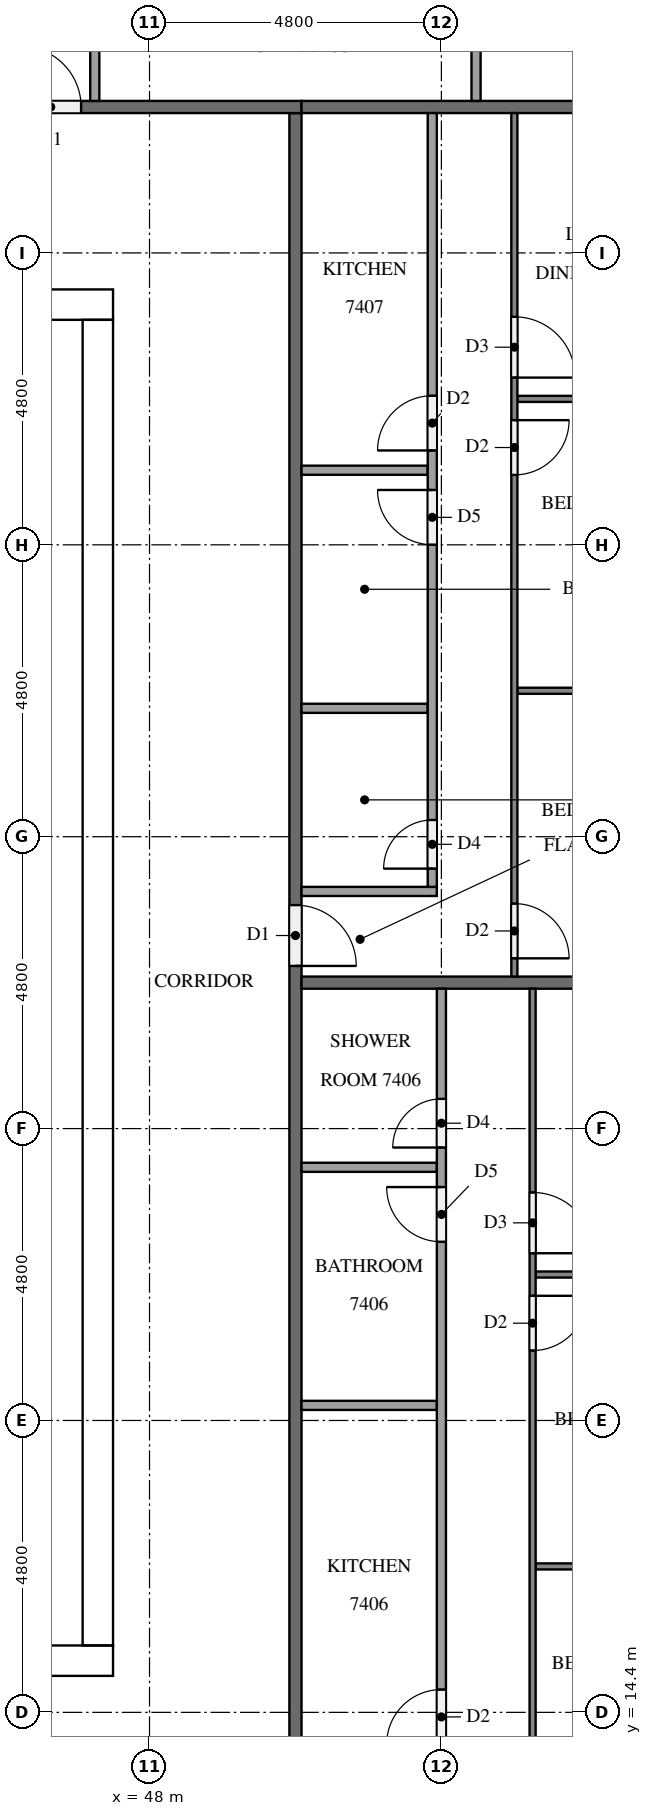
"""IFC4 building model, lengths in metres.
Left out: names, types, materials, properties, quantities, classifications, styles, units other than length and angle.
Written with IfcOpenShell. Run it as: python <this file> out.ifc"""

import sys

from ifc_helpers import new_model, si_unit, direction, frame, frame_2d, origin, place, context, subcontext, project, spatial, rectangle, extrude, element, fill, save


model = new_model("IFC4")
c1 = context("Model", 3, precision=1e-05, world=origin(), true_north=direction((0.0, 1.0)))
c2 = subcontext(c1, "Body", "Model", "MODEL_VIEW")
j1 = project(units=[si_unit("LENGTHUNIT", "METRE"), si_unit("PLANEANGLEUNIT", "RADIAN")], contexts=[c1])
p1 = place(None, origin())
s1 = spatial("IfcSite", under=j1, at=p1, CompositionType="ELEMENT")
p2 = place(p1, origin())
s2 = spatial("IfcBuilding", under=s1, at=p2, CompositionType="ELEMENT")
p3 = place(p2, frame((0.0, 0.0, 282.6)))
s3 = spatial("IfcBuildingStorey", under=s2, at=p3, CompositionType="ELEMENT", Elevation=282.6)
p4 = place(p3, frame((15.0, 15.25, 0.0), z_axis=(0.0, 0.0, 1.0), x_axis=(1.0, 0.0, 0.0)))
e1 = element("IfcWall", 1, at=p4, inside=s3, PredefinedType="SHEAR", context=c2, shape_type="SweptSolid", body=[
    extrude(rectangle(XDim=32.4, YDim=0.5, at=frame_2d((16.2, 0.0))), origin(), (0.0, 0.0, 1.0), 3.2),
])
p5 = place(p4, frame((15.3, 0.0, 0.0)))
e2 = element("IfcOpeningElement", 2, at=p5, cuts=e1, PredefinedType="OPENING", context=c2, shape_type="SweptSolid", body=[
    extrude(rectangle(XDim=1.8, YDim=2.1, at=frame_2d((0.9, 1.05))), frame((0.0, 0.26, 0.0), z_axis=(0.0, -1.0, 0.0), x_axis=(1.0, 0.0, 0.0)), (0.0, 0.0, 1.0), 0.52),
])
p6 = place(p3, frame((15.0, 37.55, 0.0), z_axis=(0.0, 0.0, 1.0), x_axis=(1.0, 0.0, 0.0)))
e3 = element("IfcWall", 3, at=p6, inside=s3, PredefinedType="SHEAR", context=c2, shape_type="SweptSolid", body=[
    extrude(rectangle(XDim=32.4, YDim=0.5, at=frame_2d((16.2, 0.0))), origin(), (0.0, 0.0, 1.0), 3.2),
])
p7 = place(p6, frame((15.3, 0.0, 0.0)))
e4 = element("IfcOpeningElement", 4, at=p7, cuts=e3, PredefinedType="OPENING", context=c2, shape_type="SweptSolid", body=[
    extrude(rectangle(XDim=1.8, YDim=2.1, at=frame_2d((0.9, 1.05))), frame((0.0, 0.26, 0.0), z_axis=(0.0, -1.0, 0.0), x_axis=(1.0, 0.0, 0.0)), (0.0, 0.0, 1.0), 0.52),
])
p8 = place(p6, frame((1.282, 0.0, 0.0)))
e5 = element("IfcOpeningElement", 5, at=p8, cuts=e3, PredefinedType="OPENING", context=c2, shape_type="SweptSolid", body=[
    extrude(rectangle(XDim=1.0, YDim=2.1, at=frame_2d((0.5, 1.05))), frame((0.0, 0.26, 0.0), z_axis=(0.0, -1.0, 0.0), x_axis=(1.0, 0.0, 0.0)), (0.0, 0.0, 1.0), 0.52),
])
p9 = place(p6, frame((5.082, 0.0, 0.0)))
e6 = element("IfcOpeningElement", 6, at=p9, cuts=e3, PredefinedType="OPENING", context=c2, shape_type="SweptSolid", body=[
    extrude(rectangle(XDim=1.0, YDim=2.1, at=frame_2d((0.5, 1.05))), frame((0.0, 0.26, 0.0), z_axis=(0.0, -1.0, 0.0), x_axis=(1.0, 0.0, 0.0)), (0.0, 0.0, 1.0), 0.52),
])
p10 = place(p3, frame((47.15, 15.5, 0.0), z_axis=(0.0, 0.0, 1.0), x_axis=(0.0, 1.0, 0.0)))
e7 = element("IfcWall", 7, at=p10, inside=s3, PredefinedType="SHEAR", context=c2, shape_type="SweptSolid", body=[
    extrude(rectangle(XDim=21.8, YDim=0.5, at=frame_2d((10.9, 0.0))), origin(), (0.0, 0.0, 1.0), 3.2),
])
p11 = place(p10, frame((10.6, 0.0, 0.0)))
e8 = element("IfcOpeningElement", 8, at=p11, cuts=e7, PredefinedType="OPENING", context=c2, shape_type="SweptSolid", body=[
    extrude(rectangle(XDim=1.2, YDim=2.1, at=frame_2d((0.6, 1.05))), frame((0.0, 0.26, 0.0), z_axis=(0.0, -1.0, 0.0), x_axis=(1.0, 0.0, 0.0)), (0.0, 0.0, 1.0), 0.52),
])
p12 = place(p3, frame((50.4, 40.7, 0.0), z_axis=(0.0, 0.0, 1.0), x_axis=(0.0, -1.0, 0.0)))
e9 = element("IfcWall", 9, at=p12, inside=s3, PredefinedType="PARTITIONING", context=c2, shape_type="SweptSolid", body=[
    extrude(rectangle(XDim=28.6, YDim=0.2, at=frame_2d((14.3, 0.0))), origin(), (0.0, 0.0, 1.0), 3.2),
])
p13 = place(p12, frame((27.425, 0.0, 0.0)))
e10 = element("IfcOpeningElement", 10, at=p13, cuts=e9, PredefinedType="OPENING", context=c2, shape_type="SweptSolid", body=[
    extrude(rectangle(XDim=1.0, YDim=2.1, at=frame_2d((0.5, 1.05))), frame((0.0, 0.11, 0.0), z_axis=(0.0, -1.0, 0.0), x_axis=(1.0, 0.0, 0.0)), (0.0, 0.0, 1.0), 0.22),
])
p14 = place(p12, frame((13.025, 0.0, 0.0)))
e11 = element("IfcOpeningElement", 11, at=p14, cuts=e9, PredefinedType="OPENING", context=c2, shape_type="SweptSolid", body=[
    extrude(rectangle(XDim=1.0, YDim=2.1, at=frame_2d((0.5, 1.05))), frame((0.0, 0.11, 0.0), z_axis=(0.0, -1.0, 0.0), x_axis=(1.0, 0.0, 0.0)), (0.0, 0.0, 1.0), 0.22),
])
p15 = place(p3, frame((11.9, 40.8, 0.0), z_axis=(0.0, 0.0, 1.0), x_axis=(1.0, 0.0, 0.0)))
e12 = element("IfcWall", 12, at=p15, inside=s3, PredefinedType="PARTITIONING", context=c2, shape_type="SweptSolid", body=[
    extrude(rectangle(XDim=38.6, YDim=0.2, at=frame_2d((19.3, 0.0))), origin(), (0.0, 0.0, 1.0), 3.2),
])
p16 = place(p15, frame((33.975, 0.0, 0.0)))
e13 = element("IfcOpeningElement", 13, at=p16, cuts=e12, PredefinedType="OPENING", context=c2, shape_type="SweptSolid", body=[
    extrude(rectangle(XDim=1.0, YDim=2.1, at=frame_2d((0.5, 1.05))), frame((0.0, 0.11, 0.0), z_axis=(0.0, -1.0, 0.0), x_axis=(1.0, 0.0, 0.0)), (0.0, 0.0, 1.0), 0.22),
])
p17 = place(p15, frame((14.725, 0.0, 0.0)))
e14 = element("IfcOpeningElement", 14, at=p17, cuts=e12, PredefinedType="OPENING", context=c2, shape_type="SweptSolid", body=[
    extrude(rectangle(XDim=1.1, YDim=2.1, at=frame_2d((0.55, 1.05))), frame((0.0, 0.11, 0.0), z_axis=(0.0, -1.0, 0.0), x_axis=(1.0, 0.0, 0.0)), (0.0, 0.0, 1.0), 0.22),
])
p18 = place(p15, frame((13.225, 0.0, 0.0)))
e15 = element("IfcOpeningElement", 15, at=p18, cuts=e12, PredefinedType="OPENING", context=c2, shape_type="SweptSolid", body=[
    extrude(rectangle(XDim=1.0, YDim=2.1, at=frame_2d((0.5, 1.05))), frame((0.0, 0.11, 0.0), z_axis=(0.0, -1.0, 0.0), x_axis=(1.0, 0.0, 0.0)), (0.0, 0.0, 1.0), 0.22),
])
p19 = place(p15, frame((1.225, 0.0, 0.0)))
e16 = element("IfcOpeningElement", 16, at=p19, cuts=e12, PredefinedType="OPENING", context=c2, shape_type="SweptSolid", body=[
    extrude(rectangle(XDim=1.0, YDim=2.1, at=frame_2d((0.5, 1.05))), frame((0.0, 0.11, 0.0), z_axis=(0.0, -1.0, 0.0), x_axis=(1.0, 0.0, 0.0)), (0.0, 0.0, 1.0), 0.22),
])
for number, where, z_axis, x_axis in (
    (17, (50.5, 26.4, 0.0), (0.0, 0.0, 1.0), (1.0, 0.0, 0.0)),
    (18, (50.5, 40.8, 0.0), (0.0, 0.0, 1.0), (1.0, 0.0, 0.0)),
):
    element("IfcWall", number, at=place(p3, frame(where, z_axis=z_axis, x_axis=x_axis)), inside=s3, PredefinedType="PARTITIONING", context=c2, shape_type="SweptSolid", body=[
        extrude(rectangle(XDim=7.0, YDim=0.2, at=frame_2d((3.5, 0.0))), origin(), (0.0, 0.0, 1.0), 3.2),
    ])
for number, where, z_axis, x_axis in (
    (19, (54.35, 16.8, 0.0), (0.0, 0.0, 1.0), (1.0, 0.0, 0.0)),
    (20, (54.35, 21.6, 0.0), (0.0, 0.0, 1.0), (1.0, 0.0, 0.0)),
):
    element("IfcWall", number, at=place(p3, frame(where, z_axis=z_axis, x_axis=x_axis)), inside=s3, PredefinedType="PARTITIONING", context=c2, shape_type="SweptSolid", body=[
        extrude(rectangle(XDim=3.15, YDim=0.1, at=frame_2d((1.575, 0.0))), origin(), (0.0, 0.0, 1.0), 3.2),
    ])
p20 = place(p3, frame((54.3, 26.3, 0.0), z_axis=(0.0, 0.0, 1.0), x_axis=(0.0, -1.0, 0.0)))
e21 = element("IfcWall", 21, at=p20, inside=s3, PredefinedType="PARTITIONING", context=c2, shape_type="SweptSolid", body=[
    extrude(rectangle(XDim=14.2, YDim=0.1, at=frame_2d((7.1, 0.0))), origin(), (0.0, 0.0, 1.0), 3.2),
])
p21 = place(p20, frame((13.0, 0.0, 0.0)))
e22 = element("IfcOpeningElement", 22, at=p21, cuts=e21, PredefinedType="OPENING", context=c2, shape_type="SweptSolid", body=[
    extrude(rectangle(XDim=0.9, YDim=2.1, at=frame_2d((0.45, 1.05))), frame((0.0, 0.06, 0.0), z_axis=(0.0, -1.0, 0.0), x_axis=(1.0, 0.0, 0.0)), (0.0, 0.0, 1.0), 0.12),
])
p22 = place(p20, frame((5.05, 0.0, 0.0)))
e23 = element("IfcOpeningElement", 23, at=p22, cuts=e21, PredefinedType="OPENING", context=c2, shape_type="SweptSolid", body=[
    extrude(rectangle(XDim=0.9, YDim=2.1, at=frame_2d((0.45, 1.05))), frame((0.0, 0.06, 0.0), z_axis=(0.0, -1.0, 0.0), x_axis=(1.0, 0.0, 0.0)), (0.0, 0.0, 1.0), 0.12),
])
p23 = place(p20, frame((3.35, 0.0, 0.0)))
e24 = element("IfcOpeningElement", 24, at=p23, cuts=e21, PredefinedType="OPENING", context=c2, shape_type="SweptSolid", body=[
    extrude(rectangle(XDim=1.0, YDim=2.1, at=frame_2d((0.5, 1.05))), frame((0.0, 0.06, 0.0), z_axis=(0.0, -1.0, 0.0), x_axis=(1.0, 0.0, 0.0)), (0.0, 0.0, 1.0), 0.12),
])
for number, where, z_axis, x_axis in (
    (25, (50.5, 19.448, 0.0), (0.0, 0.0, 1.0), (1.0, 0.0, 0.0)),
    (26, (50.5, 23.364, 0.0), (0.0, 0.0, 1.0), (1.0, 0.0, 0.0)),
):
    element("IfcWall", number, at=place(p3, frame(where, z_axis=z_axis, x_axis=x_axis)), inside=s3, PredefinedType="PARTITIONING", context=c2, shape_type="SweptSolid", body=[
        extrude(rectangle(XDim=2.225, YDim=0.15, at=frame_2d((1.113, 0.0))), origin(), (0.0, 0.0, 1.0), 3.2),
    ])
p24 = place(p3, frame((52.8, 13.575, 0.0), z_axis=(0.0, 0.0, 1.0), x_axis=(0.0, 1.0, 0.0)))
e27 = element("IfcWall", 27, at=p24, inside=s3, PredefinedType="PARTITIONING", context=c2, shape_type="SweptSolid", body=[
    extrude(rectangle(XDim=12.725, YDim=0.15, at=frame_2d((6.363, 0.0))), origin(), (0.0, 0.0, 1.0), 3.2),
])
p25 = place(p24, frame((0.3, 0.0, 0.0)))
e28 = element("IfcOpeningElement", 28, at=p25, cuts=e27, PredefinedType="OPENING", context=c2, shape_type="SweptSolid", body=[
    extrude(rectangle(XDim=0.9, YDim=2.1, at=frame_2d((0.45, 1.05))), frame((0.0, 0.085, 0.0), z_axis=(0.0, -1.0, 0.0), x_axis=(1.0, 0.0, 0.0)), (0.0, 0.0, 1.0), 0.17),
])
p26 = place(p24, frame((8.563, 0.0, 0.0)))
e29 = element("IfcOpeningElement", 29, at=p26, cuts=e27, PredefinedType="OPENING", context=c2, shape_type="SweptSolid", body=[
    extrude(rectangle(XDim=0.9, YDim=2.1, at=frame_2d((0.45, 1.05))), frame((0.0, 0.085, 0.0), z_axis=(0.0, -1.0, 0.0), x_axis=(1.0, 0.0, 0.0)), (0.0, 0.0, 1.0), 0.17),
])
p27 = place(p24, frame((10.114, 0.0, 0.0)))
e30 = element("IfcOpeningElement", 30, at=p27, cuts=e27, PredefinedType="OPENING", context=c2, shape_type="SweptSolid", body=[
    extrude(rectangle(XDim=0.8, YDim=2.1, at=frame_2d((0.4, 1.05))), frame((0.0, 0.085, 0.0), z_axis=(0.0, -1.0, 0.0), x_axis=(1.0, 0.0, 0.0)), (0.0, 0.0, 1.0), 0.17),
])
for number, where, z_axis, x_axis in (
    (31, (54.05, 31.2, 0.0), (0.0, 0.0, 1.0), (1.0, 0.0, 0.0)),
    (32, (54.05, 36.0, 0.0), (0.0, 0.0, 1.0), (1.0, 0.0, 0.0)),
):
    element("IfcWall", number, at=place(p3, frame(where, z_axis=z_axis, x_axis=x_axis)), inside=s3, PredefinedType="PARTITIONING", context=c2, shape_type="SweptSolid", body=[
        extrude(rectangle(XDim=3.45, YDim=0.1, at=frame_2d((1.725, 0.0))), origin(), (0.0, 0.0, 1.0), 3.2),
    ])
p28 = place(p3, frame((54.0, 40.7, 0.0), z_axis=(0.0, 0.0, 1.0), x_axis=(0.0, -1.0, 0.0)))
e33 = element("IfcWall", 33, at=p28, inside=s3, PredefinedType="PARTITIONING", context=c2, shape_type="SweptSolid", body=[
    extrude(rectangle(XDim=14.2, YDim=0.1, at=frame_2d((7.1, 0.0))), origin(), (0.0, 0.0, 1.0), 3.2),
])
p29 = place(p28, frame((13.0, 0.0, 0.0)))
e34 = element("IfcOpeningElement", 34, at=p29, cuts=e33, PredefinedType="OPENING", context=c2, shape_type="SweptSolid", body=[
    extrude(rectangle(XDim=0.9, YDim=2.1, at=frame_2d((0.45, 1.05))), frame((0.0, 0.06, 0.0), z_axis=(0.0, -1.0, 0.0), x_axis=(1.0, 0.0, 0.0)), (0.0, 0.0, 1.0), 0.12),
])
p30 = place(p28, frame((5.05, 0.0, 0.0)))
e35 = element("IfcOpeningElement", 35, at=p30, cuts=e33, PredefinedType="OPENING", context=c2, shape_type="SweptSolid", body=[
    extrude(rectangle(XDim=0.9, YDim=2.1, at=frame_2d((0.45, 1.05))), frame((0.0, 0.06, 0.0), z_axis=(0.0, -1.0, 0.0), x_axis=(1.0, 0.0, 0.0)), (0.0, 0.0, 1.0), 0.12),
])
p31 = place(p28, frame((3.35, 0.0, 0.0)))
e36 = element("IfcOpeningElement", 36, at=p31, cuts=e33, PredefinedType="OPENING", context=c2, shape_type="SweptSolid", body=[
    extrude(rectangle(XDim=1.0, YDim=2.1, at=frame_2d((0.5, 1.05))), frame((0.0, 0.06, 0.0), z_axis=(0.0, -1.0, 0.0), x_axis=(1.0, 0.0, 0.0)), (0.0, 0.0, 1.0), 0.12),
])
for number, where, z_axis, x_axis in (
    (37, (50.5, 30.912, 0.0), (0.0, 0.0, 1.0), (1.0, 0.0, 0.0)),
    (38, (50.5, 34.827, 0.0), (0.0, 0.0, 1.0), (1.0, 0.0, 0.0)),
):
    element("IfcWall", number, at=place(p3, frame(where, z_axis=z_axis, x_axis=x_axis)), inside=s3, PredefinedType="PARTITIONING", context=c2, shape_type="SweptSolid", body=[
        extrude(rectangle(XDim=2.075, YDim=0.15, at=frame_2d((1.038, 0.0))), origin(), (0.0, 0.0, 1.0), 3.2),
    ])
p32 = place(p3, frame((50.5, 27.9, 0.0), z_axis=(0.0, 0.0, 1.0), x_axis=(1.0, 0.0, 0.0)))
e39 = element("IfcWall", 39, at=p32, inside=s3, PredefinedType="PARTITIONING", context=c2, shape_type="SweptSolid", body=[
    extrude(rectangle(XDim=2.225, YDim=0.15, at=frame_2d((1.113, 0.0))), origin(), (0.0, 0.0, 1.0), 3.2),
])
p33 = place(p3, frame((52.65, 27.975, 0.0), z_axis=(0.0, 0.0, 1.0), x_axis=(0.0, 1.0, 0.0)))
e40 = element("IfcWall", 40, at=p33, inside=s3, PredefinedType="PARTITIONING", context=c2, shape_type="SweptSolid", body=[
    extrude(rectangle(XDim=12.725, YDim=0.15, at=frame_2d((6.362, 0.0))), origin(), (0.0, 0.0, 1.0), 3.2),
])
p34 = place(p33, frame((0.3, 0.0, 0.0)))
e41 = element("IfcOpeningElement", 41, at=p34, cuts=e40, PredefinedType="OPENING", context=c2, shape_type="SweptSolid", body=[
    extrude(rectangle(XDim=0.8, YDim=2.1, at=frame_2d((0.4, 1.05))), frame((0.0, 0.085, 0.0), z_axis=(0.0, -1.0, 0.0), x_axis=(1.0, 0.0, 0.0)), (0.0, 0.0, 1.0), 0.17),
])
p35 = place(p33, frame((5.627, 0.0, 0.0)))
e42 = element("IfcOpeningElement", 42, at=p35, cuts=e40, PredefinedType="OPENING", context=c2, shape_type="SweptSolid", body=[
    extrude(rectangle(XDim=0.9, YDim=2.1, at=frame_2d((0.45, 1.05))), frame((0.0, 0.085, 0.0), z_axis=(0.0, -1.0, 0.0), x_axis=(1.0, 0.0, 0.0)), (0.0, 0.0, 1.0), 0.17),
])
p36 = place(p33, frame((7.177, 0.0, 0.0)))
e43 = element("IfcOpeningElement", 43, at=p36, cuts=e40, PredefinedType="OPENING", context=c2, shape_type="SweptSolid", body=[
    extrude(rectangle(XDim=0.9, YDim=2.1, at=frame_2d((0.45, 1.05))), frame((0.0, 0.085, 0.0), z_axis=(0.0, -1.0, 0.0), x_axis=(1.0, 0.0, 0.0)), (0.0, 0.0, 1.0), 0.17),
])
p37 = place(p3, frame((53.37, 40.9, 0.0), z_axis=(0.0, 0.0, 1.0), x_axis=(0.0, 1.0, 0.0)))
e44 = element("IfcWall", 44, at=p37, inside=s3, PredefinedType="PARTITIONING", context=c2, shape_type="SweptSolid", body=[
    extrude(rectangle(XDim=1.775, YDim=0.15, at=frame_2d((0.888, 0.0))), origin(), (0.0, 0.0, 1.0), 3.2),
])
p38 = place(p3, frame((47.1, 40.9, 0.0), z_axis=(0.0, 0.0, 1.0), x_axis=(0.0, 1.0, 0.0)))
e45 = element("IfcWall", 45, at=p38, inside=s3, PredefinedType="PARTITIONING", context=c2, shape_type="SweptSolid", body=[
    extrude(rectangle(XDim=1.925, YDim=0.15, at=frame_2d((0.962, 0.0))), origin(), (0.0, 0.0, 1.0), 3.2),
])
p39 = place(p11, origin())
e46 = element("IfcDoor", 46, at=p39, inside=s3, OperationType="SINGLE_SWING_RIGHT", PredefinedType="DOOR", context=c2, shape_type="SweptSolid", body=[
    extrude(rectangle(XDim=1.2, YDim=2.1, at=frame_2d((0.6, 1.05))), frame((0.0, 0.025, 0.0), z_axis=(0.0, -1.0, 0.0), x_axis=(1.0, 0.0, 0.0)), (0.0, 0.0, 1.0), 0.05),
])
fill(e8, e46)
p40 = place(p14, origin())
e47 = element("IfcDoor", 47, at=p40, inside=s3, OperationType="SINGLE_SWING_RIGHT", PredefinedType="DOOR", context=c2, shape_type="SweptSolid", body=[
    extrude(rectangle(XDim=1.0, YDim=2.1, at=frame_2d((0.5, 1.05))), frame((0.0, 0.025, 0.0), z_axis=(0.0, -1.0, 0.0), x_axis=(1.0, 0.0, 0.0)), (0.0, 0.0, 1.0), 0.05),
])
fill(e11, e47)
p41 = place(p16, origin())
e48 = element("IfcDoor", 48, at=p41, inside=s3, OperationType="SINGLE_SWING_LEFT", PredefinedType="DOOR", context=c2, shape_type="SweptSolid", body=[
    extrude(rectangle(XDim=1.0, YDim=2.1, at=frame_2d((0.5, 1.05))), frame((0.0, 0.025, 0.0), z_axis=(0.0, -1.0, 0.0), x_axis=(1.0, 0.0, 0.0)), (0.0, 0.0, 1.0), 0.05),
])
fill(e13, e48)
p42 = place(p22, origin())
e49 = element("IfcDoor", 49, at=p42, inside=s3, OperationType="SINGLE_SWING_LEFT", PredefinedType="DOOR", context=c2, shape_type="SweptSolid", body=[
    extrude(rectangle(XDim=0.9, YDim=2.1, at=frame_2d((0.45, 1.05))), frame((0.0, 0.025, 0.0), z_axis=(0.0, -1.0, 0.0), x_axis=(1.0, 0.0, 0.0)), (0.0, 0.0, 1.0), 0.05),
])
fill(e23, e49)
p43 = place(p23, origin())
e50 = element("IfcDoor", 50, at=p43, inside=s3, OperationType="SINGLE_SWING_RIGHT", PredefinedType="DOOR", context=c2, shape_type="SweptSolid", body=[
    extrude(rectangle(XDim=1.0, YDim=2.1, at=frame_2d((0.5, 1.05))), frame((0.0, 0.025, 0.0), z_axis=(0.0, -1.0, 0.0), x_axis=(1.0, 0.0, 0.0)), (0.0, 0.0, 1.0), 0.05),
])
fill(e24, e50)
p44 = place(p25, origin())
e51 = element("IfcDoor", 51, at=p44, inside=s3, OperationType="SINGLE_SWING_LEFT", PredefinedType="DOOR", context=c2, shape_type="SweptSolid", body=[
    extrude(rectangle(XDim=0.9, YDim=2.1, at=frame_2d((0.45, 1.05))), frame((0.0, 0.025, 0.0), z_axis=(0.0, -1.0, 0.0), x_axis=(1.0, 0.0, 0.0)), (0.0, 0.0, 1.0), 0.05),
])
fill(e28, e51)
p45 = place(p26, origin())
e52 = element("IfcDoor", 52, at=p45, inside=s3, OperationType="SINGLE_SWING_RIGHT", PredefinedType="DOOR", context=c2, shape_type="SweptSolid", body=[
    extrude(rectangle(XDim=0.9, YDim=2.1, at=frame_2d((0.45, 1.05))), frame((0.0, 0.025, 0.0), z_axis=(0.0, -1.0, 0.0), x_axis=(1.0, 0.0, 0.0)), (0.0, 0.0, 1.0), 0.05),
])
fill(e29, e52)
p46 = place(p27, origin())
e53 = element("IfcDoor", 53, at=p46, inside=s3, OperationType="SINGLE_SWING_LEFT", PredefinedType="DOOR", context=c2, shape_type="SweptSolid", body=[
    extrude(rectangle(XDim=0.8, YDim=2.1, at=frame_2d((0.4, 1.05))), frame((0.0, 0.025, 0.0), z_axis=(0.0, -1.0, 0.0), x_axis=(1.0, 0.0, 0.0)), (0.0, 0.0, 1.0), 0.05),
])
fill(e30, e53)
p47 = place(p29, origin())
e54 = element("IfcDoor", 54, at=p47, inside=s3, OperationType="SINGLE_SWING_RIGHT", PredefinedType="DOOR", context=c2, shape_type="SweptSolid", body=[
    extrude(rectangle(XDim=0.9, YDim=2.1, at=frame_2d((0.45, 1.05))), frame((0.0, 0.025, 0.0), z_axis=(0.0, -1.0, 0.0), x_axis=(1.0, 0.0, 0.0)), (0.0, 0.0, 1.0), 0.05),
])
fill(e34, e54)
p48 = place(p30, origin())
e55 = element("IfcDoor", 55, at=p48, inside=s3, OperationType="SINGLE_SWING_LEFT", PredefinedType="DOOR", context=c2, shape_type="SweptSolid", body=[
    extrude(rectangle(XDim=0.9, YDim=2.1, at=frame_2d((0.45, 1.05))), frame((0.0, 0.025, 0.0), z_axis=(0.0, -1.0, 0.0), x_axis=(1.0, 0.0, 0.0)), (0.0, 0.0, 1.0), 0.05),
])
fill(e35, e55)
p49 = place(p31, origin())
e56 = element("IfcDoor", 56, at=p49, inside=s3, OperationType="SINGLE_SWING_RIGHT", PredefinedType="DOOR", context=c2, shape_type="SweptSolid", body=[
    extrude(rectangle(XDim=1.0, YDim=2.1, at=frame_2d((0.5, 1.05))), frame((0.0, 0.025, 0.0), z_axis=(0.0, -1.0, 0.0), x_axis=(1.0, 0.0, 0.0)), (0.0, 0.0, 1.0), 0.05),
])
fill(e36, e56)
p50 = place(p34, origin())
e57 = element("IfcDoor", 57, at=p50, inside=s3, OperationType="SINGLE_SWING_LEFT", PredefinedType="DOOR", context=c2, shape_type="SweptSolid", body=[
    extrude(rectangle(XDim=0.8, YDim=2.1, at=frame_2d((0.4, 1.05))), frame((0.0, 0.025, 0.0), z_axis=(0.0, -1.0, 0.0), x_axis=(1.0, 0.0, 0.0)), (0.0, 0.0, 1.0), 0.05),
])
fill(e41, e57)
p51 = place(p35, origin())
e58 = element("IfcDoor", 58, at=p51, inside=s3, OperationType="SINGLE_SWING_RIGHT", PredefinedType="DOOR", context=c2, shape_type="SweptSolid", body=[
    extrude(rectangle(XDim=0.9, YDim=2.1, at=frame_2d((0.45, 1.05))), frame((0.0, 0.025, 0.0), z_axis=(0.0, -1.0, 0.0), x_axis=(1.0, 0.0, 0.0)), (0.0, 0.0, 1.0), 0.05),
])
fill(e42, e58)
p52 = place(p36, origin())
e59 = element("IfcDoor", 59, at=p52, inside=s3, OperationType="SINGLE_SWING_LEFT", PredefinedType="DOOR", context=c2, shape_type="SweptSolid", body=[
    extrude(rectangle(XDim=0.9, YDim=2.1, at=frame_2d((0.45, 1.05))), frame((0.0, 0.025, 0.0), z_axis=(0.0, -1.0, 0.0), x_axis=(1.0, 0.0, 0.0)), (0.0, 0.0, 1.0), 0.05),
])
fill(e43, e59)
save(model, sys.argv[1])
